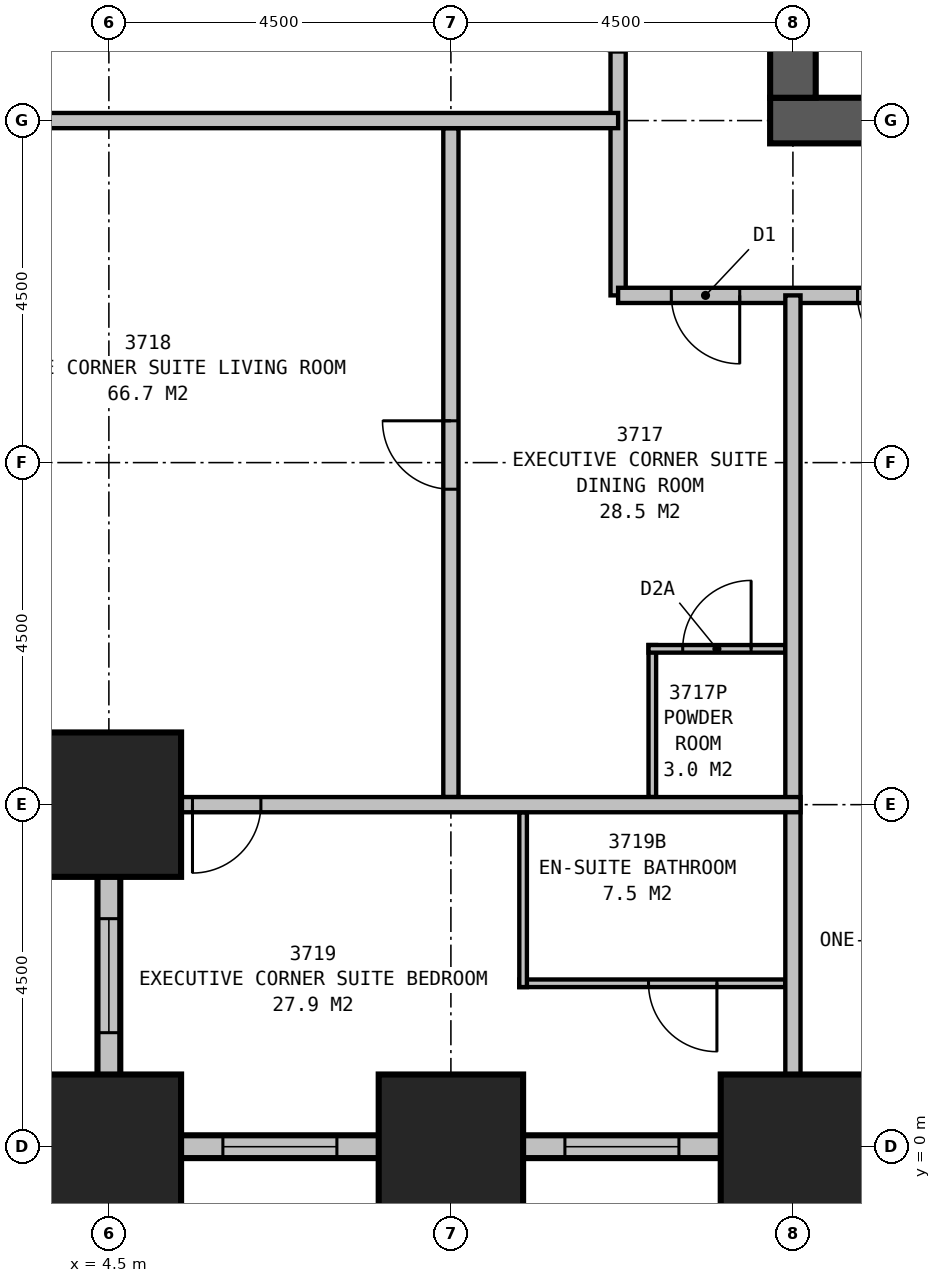
"""IFC4 building model, lengths in metres.
Left out: names, types, materials, properties, quantities, classifications, styles, units other than length and angle.
Written with IfcOpenShell. Run it as: python <this file> out.ifc"""

import sys

from ifc_helpers import new_model, si_unit, direction, frame, frame_2d, origin, origin_2d, place, context, subcontext, project, spatial, rectangle, extrude, element, fill, save


model = new_model("IFC4")
c1 = context("Model", 3, precision=1e-05, world=origin(), true_north=direction((0.0, 1.0)))
c2 = subcontext(c1, "Body", "Model", "MODEL_VIEW")
j1 = project(units=[si_unit("LENGTHUNIT", "METRE"), si_unit("PLANEANGLEUNIT", "RADIAN")], contexts=[c1])
p1 = place(None, origin())
s1 = spatial("IfcSite", under=j1, at=p1, CompositionType="ELEMENT")
p2 = place(p1, origin())
s2 = spatial("IfcBuilding", under=s1, at=p2, CompositionType="ELEMENT")
p3 = place(p2, frame((0.0, 0.0, 142.4)))
s3 = spatial("IfcBuildingStorey", under=s2, at=p3, CompositionType="ELEMENT", Elevation=142.4)
for number, where, z_axis, x_axis in (
    (1, (4.5, 4.5, 0.0), (0.0, 0.0, 1.0), (1.0, 0.0, 0.0)),
    (2, (4.5, 0.0, 0.0), (0.0, 0.0, 1.0), (1.0, 0.0, 0.0)),
    (3, (9.0, 0.0, 0.0), (0.0, 0.0, 1.0), (1.0, 0.0, 0.0)),
    (4, (13.5, 0.0, 0.0), (0.0, 0.0, 1.0), (1.0, 0.0, 0.0)),
):
    element("IfcColumn", number, at=place(p3, frame(where, z_axis=z_axis, x_axis=x_axis)), inside=s3, PredefinedType="COLUMN", context=c2, shape_type="SweptSolid", body=[
        extrude(rectangle(XDim=1.9, YDim=1.9, at=origin_2d()), origin(), (0.0, 0.0, 1.0), 3.5),
    ])
p4 = place(p3, frame((13.2, 13.5, 0.0), z_axis=(0.0, 0.0, 1.0), x_axis=(1.0, 0.0, 0.0)))
e5 = element("IfcWall", 5, at=p4, inside=s3, PredefinedType="SHEAR", context=c2, shape_type="SweptSolid", body=[
    extrude(rectangle(XDim=23.1, YDim=0.6, at=frame_2d((11.55, 0.0))), origin(), (0.0, 0.0, 1.0), 3.5),
])
p5 = place(p3, frame((13.5, 16.5, 0.0), z_axis=(0.0, 0.0, 1.0), x_axis=(0.0, -1.0, 0.0)))
e6 = element("IfcWall", 6, at=p5, inside=s3, PredefinedType="SHEAR", context=c2, shape_type="SweptSolid", body=[
    extrude(rectangle(XDim=2.7, YDim=0.6, at=frame_2d((1.35, 0.0))), origin(), (0.0, 0.0, 1.0), 3.5),
])
p6 = place(p3, frame((0.35, 4.5, 0.0), z_axis=(0.0, 0.0, 1.0), x_axis=(1.0, 0.0, 0.0)))
e7 = element("IfcWall", 7, at=p6, inside=s3, PredefinedType="STANDARD", context=c2, shape_type="SweptSolid", body=[
    extrude(rectangle(XDim=4.3, YDim=0.3, at=frame_2d((2.15, 0.0))), origin(), (0.0, 0.0, 1.0), 2.1),
])
p7 = place(p6, frame((1.4, 0.0, 0.5)))
e8 = element("IfcOpeningElement", 8, at=p7, cuts=e7, PredefinedType="OPENING", context=c2, shape_type="SweptSolid", body=[
    extrude(rectangle(XDim=1.5, YDim=1.4, at=frame_2d((0.75, 0.7))), frame((0.0, 0.16, 0.0), z_axis=(0.0, -1.0, 0.0), x_axis=(1.0, 0.0, 0.0)), (0.0, 0.0, 1.0), 0.32),
])
p8 = place(p3, frame((4.5, 4.65, 0.0), z_axis=(0.0, 0.0, 1.0), x_axis=(0.0, -1.0, 0.0)))
e9 = element("IfcWall", 9, at=p8, inside=s3, PredefinedType="STANDARD", context=c2, shape_type="SweptSolid", body=[
    extrude(rectangle(XDim=4.8, YDim=0.3, at=frame_2d((2.4, 0.0))), origin(), (0.0, 0.0, 1.0), 2.1),
])
p9 = place(p8, frame((1.65, 0.0, 0.5)))
e10 = element("IfcOpeningElement", 10, at=p9, cuts=e9, PredefinedType="OPENING", context=c2, shape_type="SweptSolid", body=[
    extrude(rectangle(XDim=1.5, YDim=1.4, at=frame_2d((0.75, 0.7))), frame((0.0, 0.16, 0.0), z_axis=(0.0, -1.0, 0.0), x_axis=(1.0, 0.0, 0.0)), (0.0, 0.0, 1.0), 0.32),
])
p10 = place(p3, frame((4.35, 0.0, 0.0), z_axis=(0.0, 0.0, 1.0), x_axis=(1.0, 0.0, 0.0)))
e11 = element("IfcWall", 11, at=p10, inside=s3, PredefinedType="STANDARD", context=c2, shape_type="SweptSolid", body=[
    extrude(rectangle(XDim=40.8, YDim=0.3, at=frame_2d((20.4, 0.0))), origin(), (0.0, 0.0, 1.0), 2.1),
])
p11 = place(p10, frame((1.65, 0.0, 0.5)))
e12 = element("IfcOpeningElement", 12, at=p11, cuts=e11, PredefinedType="OPENING", context=c2, shape_type="SweptSolid", body=[
    extrude(rectangle(XDim=1.5, YDim=1.4, at=frame_2d((0.75, 0.7))), frame((0.0, 0.16, 0.0), z_axis=(0.0, -1.0, 0.0), x_axis=(1.0, 0.0, 0.0)), (0.0, 0.0, 1.0), 0.32),
])
p12 = place(p10, frame((6.15, 0.0, 0.5)))
e13 = element("IfcOpeningElement", 13, at=p12, cuts=e11, PredefinedType="OPENING", context=c2, shape_type="SweptSolid", body=[
    extrude(rectangle(XDim=1.5, YDim=1.4, at=frame_2d((0.75, 0.7))), frame((0.0, 0.16, 0.0), z_axis=(0.0, -1.0, 0.0), x_axis=(1.0, 0.0, 0.0)), (0.0, 0.0, 1.0), 0.32),
])
p13 = place(p10, frame((10.65, 0.0, 0.5)))
e14 = element("IfcOpeningElement", 14, at=p13, cuts=e11, PredefinedType="OPENING", context=c2, shape_type="SweptSolid", body=[
    extrude(rectangle(XDim=1.5, YDim=1.4, at=frame_2d((0.75, 0.7))), frame((0.0, 0.16, 0.0), z_axis=(0.0, -1.0, 0.0), x_axis=(1.0, 0.0, 0.0)), (0.0, 0.0, 1.0), 0.32),
])
p14 = place(p10, frame((15.15, 0.0, 0.5)))
e15 = element("IfcOpeningElement", 15, at=p14, cuts=e11, PredefinedType="OPENING", context=c2, shape_type="SweptSolid", body=[
    extrude(rectangle(XDim=1.5, YDim=1.4, at=frame_2d((0.75, 0.7))), frame((0.0, 0.16, 0.0), z_axis=(0.0, -1.0, 0.0), x_axis=(1.0, 0.0, 0.0)), (0.0, 0.0, 1.0), 0.32),
])
p15 = place(p10, frame((19.65, 0.0, 0.5)))
e16 = element("IfcOpeningElement", 16, at=p15, cuts=e11, PredefinedType="OPENING", context=c2, shape_type="SweptSolid", body=[
    extrude(rectangle(XDim=1.5, YDim=1.4, at=frame_2d((0.75, 0.7))), frame((0.0, 0.16, 0.0), z_axis=(0.0, -1.0, 0.0), x_axis=(1.0, 0.0, 0.0)), (0.0, 0.0, 1.0), 0.32),
])
p16 = place(p10, frame((24.15, 0.0, 0.5)))
e17 = element("IfcOpeningElement", 17, at=p16, cuts=e11, PredefinedType="OPENING", context=c2, shape_type="SweptSolid", body=[
    extrude(rectangle(XDim=1.5, YDim=1.4, at=frame_2d((0.75, 0.7))), frame((0.0, 0.16, 0.0), z_axis=(0.0, -1.0, 0.0), x_axis=(1.0, 0.0, 0.0)), (0.0, 0.0, 1.0), 0.32),
])
p17 = place(p10, frame((28.65, 0.0, 0.5)))
e18 = element("IfcOpeningElement", 18, at=p17, cuts=e11, PredefinedType="OPENING", context=c2, shape_type="SweptSolid", body=[
    extrude(rectangle(XDim=1.5, YDim=1.4, at=frame_2d((0.75, 0.7))), frame((0.0, 0.16, 0.0), z_axis=(0.0, -1.0, 0.0), x_axis=(1.0, 0.0, 0.0)), (0.0, 0.0, 1.0), 0.32),
])
p18 = place(p10, frame((33.15, 0.0, 0.5)))
e19 = element("IfcOpeningElement", 19, at=p18, cuts=e11, PredefinedType="OPENING", context=c2, shape_type="SweptSolid", body=[
    extrude(rectangle(XDim=1.5, YDim=1.4, at=frame_2d((0.75, 0.7))), frame((0.0, 0.16, 0.0), z_axis=(0.0, -1.0, 0.0), x_axis=(1.0, 0.0, 0.0)), (0.0, 0.0, 1.0), 0.32),
])
p19 = place(p10, frame((37.65, 0.0, 0.5)))
e20 = element("IfcOpeningElement", 20, at=p19, cuts=e11, PredefinedType="OPENING", context=c2, shape_type="SweptSolid", body=[
    extrude(rectangle(XDim=1.5, YDim=1.4, at=frame_2d((0.75, 0.7))), frame((0.0, 0.16, 0.0), z_axis=(0.0, -1.0, 0.0), x_axis=(1.0, 0.0, 0.0)), (0.0, 0.0, 1.0), 0.32),
])
p20 = place(p3, frame((4.017, 36.149, 0.0), z_axis=(0.0, 0.0, 1.0), x_axis=(-0.110433201132, -0.993883548555, 0.0)))
e21 = element("IfcWall", 21, at=p20, inside=s3, PredefinedType="STANDARD", context=c2, shape_type="SweptSolid", body=[
    extrude(rectangle(XDim=31.994, YDim=0.3, at=frame_2d((15.997, 0.0))), origin(), (0.0, 0.0, 1.0), 2.1),
])
p21 = place(p20, frame((1.664, 0.0, 0.5)))
e22 = element("IfcOpeningElement", 22, at=p21, cuts=e21, PredefinedType="OPENING", context=c2, shape_type="SweptSolid", body=[
    extrude(rectangle(XDim=1.5, YDim=1.4, at=frame_2d((0.75, 0.7))), frame((0.0, 0.16, 0.0), z_axis=(0.0, -1.0, 0.0), x_axis=(1.0, 0.0, 0.0)), (0.0, 0.0, 1.0), 0.32),
])
p22 = place(p20, frame((6.192, 0.0, 0.5)))
e23 = element("IfcOpeningElement", 23, at=p22, cuts=e21, PredefinedType="OPENING", context=c2, shape_type="SweptSolid", body=[
    extrude(rectangle(XDim=1.5, YDim=1.4, at=frame_2d((0.75, 0.7))), frame((0.0, 0.16, 0.0), z_axis=(0.0, -1.0, 0.0), x_axis=(1.0, 0.0, 0.0)), (0.0, 0.0, 1.0), 0.32),
])
p23 = place(p20, frame((10.719, 0.0, 0.5)))
e24 = element("IfcOpeningElement", 24, at=p23, cuts=e21, PredefinedType="OPENING", context=c2, shape_type="SweptSolid", body=[
    extrude(rectangle(XDim=1.5, YDim=1.4, at=frame_2d((0.75, 0.7))), frame((0.0, 0.16, 0.0), z_axis=(0.0, -1.0, 0.0), x_axis=(1.0, 0.0, 0.0)), (0.0, 0.0, 1.0), 0.32),
])
p24 = place(p20, frame((15.247, 0.0, 0.5)))
e25 = element("IfcOpeningElement", 25, at=p24, cuts=e21, PredefinedType="OPENING", context=c2, shape_type="SweptSolid", body=[
    extrude(rectangle(XDim=1.5, YDim=1.4, at=frame_2d((0.75, 0.7))), frame((0.0, 0.16, 0.0), z_axis=(0.0, -1.0, 0.0), x_axis=(1.0, 0.0, 0.0)), (0.0, 0.0, 1.0), 0.32),
])
p25 = place(p20, frame((19.775, 0.0, 0.5)))
e26 = element("IfcOpeningElement", 26, at=p25, cuts=e21, PredefinedType="OPENING", context=c2, shape_type="SweptSolid", body=[
    extrude(rectangle(XDim=1.5, YDim=1.4, at=frame_2d((0.75, 0.7))), frame((0.0, 0.16, 0.0), z_axis=(0.0, -1.0, 0.0), x_axis=(1.0, 0.0, 0.0)), (0.0, 0.0, 1.0), 0.32),
])
p26 = place(p20, frame((24.302, 0.0, 0.5)))
e27 = element("IfcOpeningElement", 27, at=p26, cuts=e21, PredefinedType="OPENING", context=c2, shape_type="SweptSolid", body=[
    extrude(rectangle(XDim=1.5, YDim=1.4, at=frame_2d((0.75, 0.7))), frame((0.0, 0.16, 0.0), z_axis=(0.0, -1.0, 0.0), x_axis=(1.0, 0.0, 0.0)), (0.0, 0.0, 1.0), 0.32),
])
p27 = place(p20, frame((28.83, 0.0, 0.5)))
e28 = element("IfcOpeningElement", 28, at=p27, cuts=e21, PredefinedType="OPENING", context=c2, shape_type="SweptSolid", body=[
    extrude(rectangle(XDim=1.5, YDim=1.4, at=frame_2d((0.75, 0.7))), frame((0.0, 0.16, 0.0), z_axis=(0.0, -1.0, 0.0), x_axis=(1.0, 0.0, 0.0)), (0.0, 0.0, 1.0), 0.32),
])
p28 = place(p3, frame((11.2, 11.2, 0.0), z_axis=(0.0, 0.0, 1.0), x_axis=(1.0, 0.0, 0.0)))
e29 = element("IfcWall", 29, at=p28, inside=s3, PredefinedType="PARTITIONING", context=c2, shape_type="SweptSolid", body=[
    extrude(rectangle(XDim=27.1, YDim=0.2, at=frame_2d((13.55, 0.0))), origin(), (0.0, 0.0, 1.0), 3.25),
])
p29 = place(p28, frame((4.05, 0.0, 0.0), z_axis=(0.0, 0.0, 1.0), x_axis=(-1.0, 0.0, 0.0)))
e30 = element("IfcOpeningElement", 30, at=p29, cuts=e29, PredefinedType="OPENING", context=c2, shape_type="SweptSolid", body=[
    extrude(rectangle(XDim=0.9, YDim=2.1, at=frame_2d((0.45, 1.05))), frame((0.0, 0.11, 0.0), z_axis=(0.0, -1.0, 0.0), x_axis=(1.0, 0.0, 0.0)), (0.0, 0.0, 1.0), 0.22),
])
p30 = place(p28, frame((12.65, 0.0, 0.0), z_axis=(0.0, 0.0, 1.0), x_axis=(-1.0, 0.0, 0.0)))
e31 = element("IfcOpeningElement", 31, at=p30, cuts=e29, PredefinedType="OPENING", context=c2, shape_type="SweptSolid", body=[
    extrude(rectangle(XDim=1.0, YDim=2.1, at=frame_2d((0.5, 1.05))), frame((0.0, 0.11, 0.0), z_axis=(0.0, -1.0, 0.0), x_axis=(1.0, 0.0, 0.0)), (0.0, 0.0, 1.0), 0.22),
])
p31 = place(p28, frame((19.45, 0.0, 0.0), z_axis=(0.0, 0.0, 1.0), x_axis=(-1.0, 0.0, 0.0)))
e32 = element("IfcOpeningElement", 32, at=p31, cuts=e29, PredefinedType="OPENING", context=c2, shape_type="SweptSolid", body=[
    extrude(rectangle(XDim=0.9, YDim=2.1, at=frame_2d((0.45, 1.05))), frame((0.0, 0.11, 0.0), z_axis=(0.0, -1.0, 0.0), x_axis=(1.0, 0.0, 0.0)), (0.0, 0.0, 1.0), 0.22),
])
p32 = place(p28, frame((1.6, 0.0, 0.0), z_axis=(0.0, 0.0, 1.0), x_axis=(-1.0, 0.0, 0.0)))
e33 = element("IfcOpeningElement", 33, at=p32, cuts=e29, PredefinedType="OPENING", context=c2, shape_type="SweptSolid", body=[
    extrude(rectangle(XDim=0.9, YDim=2.1, at=frame_2d((0.45, 1.05))), frame((0.0, 0.11, 0.0), z_axis=(0.0, -1.0, 0.0), x_axis=(1.0, 0.0, 0.0)), (0.0, 0.0, 1.0), 0.22),
])
p33 = place(p28, frame((26.4, 0.0, 0.0), z_axis=(0.0, 0.0, 1.0), x_axis=(-1.0, 0.0, 0.0)))
e34 = element("IfcOpeningElement", 34, at=p33, cuts=e29, PredefinedType="OPENING", context=c2, shape_type="SweptSolid", body=[
    extrude(rectangle(XDim=0.9, YDim=2.1, at=frame_2d((0.45, 1.05))), frame((0.0, 0.11, 0.0), z_axis=(0.0, -1.0, 0.0), x_axis=(1.0, 0.0, 0.0)), (0.0, 0.0, 1.0), 0.22),
])
p34 = place(p3, frame((11.2, 11.2, 0.0), z_axis=(0.0, 0.0, 1.0), x_axis=(0.0, 1.0, 0.0)))
e35 = element("IfcWall", 35, at=p34, inside=s3, PredefinedType="PARTITIONING", context=c2, shape_type="SweptSolid", body=[
    extrude(rectangle(XDim=18.1, YDim=0.2, at=frame_2d((9.05, 0.0))), origin(), (0.0, 0.0, 1.0), 3.25),
])
p35 = place(p34, frame((3.2, 0.0, 0.0)))
e36 = element("IfcOpeningElement", 36, at=p35, cuts=e35, PredefinedType="OPENING", context=c2, shape_type="SweptSolid", body=[
    extrude(rectangle(XDim=1.0, YDim=2.1, at=frame_2d((0.5, 1.05))), frame((0.0, 0.11, 0.0), z_axis=(0.0, -1.0, 0.0), x_axis=(1.0, 0.0, 0.0)), (0.0, 0.0, 1.0), 0.22),
])
p36 = place(p34, frame((7.65, 0.0, 0.0)))
e37 = element("IfcOpeningElement", 37, at=p36, cuts=e35, PredefinedType="OPENING", context=c2, shape_type="SweptSolid", body=[
    extrude(rectangle(XDim=0.9, YDim=2.1, at=frame_2d((0.45, 1.05))), frame((0.0, 0.11, 0.0), z_axis=(0.0, -1.0, 0.0), x_axis=(1.0, 0.0, 0.0)), (0.0, 0.0, 1.0), 0.22),
])
p37 = place(p3, frame((11.2, 13.5, 0.0), z_axis=(0.0, 0.0, 1.0), x_axis=(-1.0, 0.0, 0.0)))
e38 = element("IfcWall", 38, at=p37, inside=s3, PredefinedType="PARTITIONING", context=c2, shape_type="SweptSolid", body=[
    extrude(rectangle(XDim=9.921, YDim=0.2, at=frame_2d((4.96, 0.0))), origin(), (0.0, 0.0, 1.0), 1.9),
])
p38 = place(p3, frame((13.5, 11.2, 0.0), z_axis=(0.0, 0.0, 1.0), x_axis=(0.0, -1.0, 0.0)))
e39 = element("IfcWall", 39, at=p38, inside=s3, PredefinedType="PARTITIONING", context=c2, shape_type="SweptSolid", body=[
    extrude(rectangle(XDim=11.2, YDim=0.2, at=frame_2d((5.6, 0.0))), origin(), (0.0, 0.0, 1.0), 2.2),
])
p39 = place(p3, frame((13.6, 4.5, 0.0), z_axis=(0.0, 0.0, 1.0), x_axis=(-1.0, 0.0, 0.0)))
e40 = element("IfcWall", 40, at=p39, inside=s3, PredefinedType="PARTITIONING", context=c2, shape_type="SweptSolid", body=[
    extrude(rectangle(XDim=9.1, YDim=0.2, at=frame_2d((4.55, 0.0))), origin(), (0.0, 0.0, 1.0), 3.25),
])
p40 = place(p39, frame((7.1, 0.0, 0.0)))
e41 = element("IfcOpeningElement", 41, at=p40, cuts=e40, PredefinedType="OPENING", context=c2, shape_type="SweptSolid", body=[
    extrude(rectangle(XDim=0.9, YDim=2.1, at=frame_2d((0.45, 1.05))), frame((0.0, 0.11, 0.0), z_axis=(0.0, -1.0, 0.0), x_axis=(1.0, 0.0, 0.0)), (0.0, 0.0, 1.0), 0.22),
])
p41 = place(p3, frame((9.0, 4.6, 0.0), z_axis=(0.0, 0.0, 1.0), x_axis=(0.0, 1.0, 0.0)))
e42 = element("IfcWall", 42, at=p41, inside=s3, PredefinedType="PARTITIONING", context=c2, shape_type="SweptSolid", body=[
    extrude(rectangle(XDim=8.8, YDim=0.2, at=frame_2d((4.4, 0.0))), origin(), (0.0, 0.0, 1.0), 2.2),
])
p42 = place(p41, frame((4.05, 0.0, 0.0)))
e43 = element("IfcOpeningElement", 43, at=p42, cuts=e42, PredefinedType="OPENING", context=c2, shape_type="SweptSolid", body=[
    extrude(rectangle(XDim=0.9, YDim=2.1, at=frame_2d((0.45, 1.05))), frame((0.0, 0.11, 0.0), z_axis=(0.0, -1.0, 0.0), x_axis=(1.0, 0.0, 0.0)), (0.0, 0.0, 1.0), 0.22),
])
p43 = place(p3, frame((11.65, 4.6, 0.0), z_axis=(0.0, 0.0, 1.0), x_axis=(0.0, 1.0, 0.0)))
e44 = element("IfcWall", 44, at=p43, inside=s3, PredefinedType="PLUMBINGWALL", context=c2, shape_type="SweptSolid", body=[
    extrude(rectangle(XDim=2.0, YDim=0.1, at=frame_2d((1.0, 0.0))), origin(), (0.0, 0.0, 1.0), 3.25),
])
p44 = place(p3, frame((13.4, 6.55, 0.0), z_axis=(0.0, 0.0, 1.0), x_axis=(-1.0, 0.0, 0.0)))
e45 = element("IfcWall", 45, at=p44, inside=s3, PredefinedType="PLUMBINGWALL", context=c2, shape_type="SweptSolid", body=[
    extrude(rectangle(XDim=1.8, YDim=0.1, at=frame_2d((0.9, 0.0))), origin(), (0.0, 0.0, 1.0), 3.25),
])
p45 = place(p44, frame((1.35, 0.0, 0.0), z_axis=(0.0, 0.0, 1.0), x_axis=(-1.0, 0.0, 0.0)))
e46 = element("IfcOpeningElement", 46, at=p45, cuts=e45, PredefinedType="OPENING", context=c2, shape_type="SweptSolid", body=[
    extrude(rectangle(XDim=0.9, YDim=2.1, at=frame_2d((0.45, 1.05))), frame((0.0, 0.06, 0.0), z_axis=(0.0, -1.0, 0.0), x_axis=(1.0, 0.0, 0.0)), (0.0, 0.0, 1.0), 0.12),
])
p46 = place(p3, frame((9.95, 4.4, 0.0), z_axis=(0.0, 0.0, 1.0), x_axis=(0.0, -1.0, 0.0)))
e47 = element("IfcWall", 47, at=p46, inside=s3, PredefinedType="PLUMBINGWALL", context=c2, shape_type="SweptSolid", body=[
    extrude(rectangle(XDim=2.3, YDim=0.1, at=frame_2d((1.15, 0.0))), origin(), (0.0, 0.0, 1.0), 3.25),
])
p47 = place(p3, frame((13.4, 2.15, 0.0), z_axis=(0.0, 0.0, 1.0), x_axis=(-1.0, 0.0, 0.0)))
e48 = element("IfcWall", 48, at=p47, inside=s3, PredefinedType="PLUMBINGWALL", context=c2, shape_type="SweptSolid", body=[
    extrude(rectangle(XDim=3.5, YDim=0.1, at=frame_2d((1.75, 0.0))), origin(), (0.0, 0.0, 1.0), 3.25),
])
p48 = place(p47, frame((0.9, 0.0, 0.0)))
e49 = element("IfcOpeningElement", 49, at=p48, cuts=e48, PredefinedType="OPENING", context=c2, shape_type="SweptSolid", body=[
    extrude(rectangle(XDim=0.9, YDim=2.1, at=frame_2d((0.45, 1.05))), frame((0.0, 0.06, 0.0), z_axis=(0.0, -1.0, 0.0), x_axis=(1.0, 0.0, 0.0)), (0.0, 0.0, 1.0), 0.12),
])
p49 = place(p9, origin())
e50 = element("IfcWindow", 50, at=p49, inside=s3, PartitioningType="SINGLE_PANEL", PredefinedType="WINDOW", context=c2, shape_type="SweptSolid", body=[
    extrude(rectangle(XDim=1.5, YDim=1.4, at=frame_2d((0.75, 0.7))), frame((0.0, 0.03, 0.0), z_axis=(0.0, -1.0, 0.0), x_axis=(1.0, 0.0, 0.0)), (0.0, 0.0, 1.0), 0.06),
])
fill(e10, e50)
p50 = place(p11, origin())
e51 = element("IfcWindow", 51, at=p50, inside=s3, PartitioningType="SINGLE_PANEL", PredefinedType="WINDOW", context=c2, shape_type="SweptSolid", body=[
    extrude(rectangle(XDim=1.5, YDim=1.4, at=frame_2d((0.75, 0.7))), frame((0.0, 0.03, 0.0), z_axis=(0.0, -1.0, 0.0), x_axis=(1.0, 0.0, 0.0)), (0.0, 0.0, 1.0), 0.06),
])
fill(e12, e51)
p51 = place(p12, origin())
e52 = element("IfcWindow", 52, at=p51, inside=s3, PartitioningType="SINGLE_PANEL", PredefinedType="WINDOW", context=c2, shape_type="SweptSolid", body=[
    extrude(rectangle(XDim=1.5, YDim=1.4, at=frame_2d((0.75, 0.7))), frame((0.0, 0.03, 0.0), z_axis=(0.0, -1.0, 0.0), x_axis=(1.0, 0.0, 0.0)), (0.0, 0.0, 1.0), 0.06),
])
fill(e13, e52)
p52 = place(p29, origin())
e53 = element("IfcDoor", 53, at=p52, inside=s3, OperationType="SINGLE_SWING_LEFT", PredefinedType="DOOR", context=c2, shape_type="SweptSolid", body=[
    extrude(rectangle(XDim=0.9, YDim=2.1, at=frame_2d((0.45, 1.05))), frame((0.0, 0.025, 0.0), z_axis=(0.0, -1.0, 0.0), x_axis=(1.0, 0.0, 0.0)), (0.0, 0.0, 1.0), 0.05),
])
fill(e30, e53)
p53 = place(p32, origin())
e54 = element("IfcDoor", 54, at=p53, inside=s3, OperationType="SINGLE_SWING_LEFT", PredefinedType="DOOR", context=c2, shape_type="SweptSolid", body=[
    extrude(rectangle(XDim=0.9, YDim=2.1, at=frame_2d((0.45, 1.05))), frame((0.0, 0.025, 0.0), z_axis=(0.0, -1.0, 0.0), x_axis=(1.0, 0.0, 0.0)), (0.0, 0.0, 1.0), 0.05),
])
fill(e33, e54)
p54 = place(p40, origin())
e55 = element("IfcDoor", 55, at=p54, inside=s3, OperationType="SINGLE_SWING_RIGHT", PredefinedType="DOOR", context=c2, shape_type="SweptSolid", body=[
    extrude(rectangle(XDim=0.9, YDim=2.1, at=frame_2d((0.45, 1.05))), frame((0.0, 0.025, 0.0), z_axis=(0.0, -1.0, 0.0), x_axis=(1.0, 0.0, 0.0)), (0.0, 0.0, 1.0), 0.05),
])
fill(e41, e55)
p55 = place(p42, origin())
e56 = element("IfcDoor", 56, at=p55, inside=s3, OperationType="SINGLE_SWING_RIGHT", PredefinedType="DOOR", context=c2, shape_type="SweptSolid", body=[
    extrude(rectangle(XDim=0.9, YDim=2.1, at=frame_2d((0.45, 1.05))), frame((0.0, 0.025, 0.0), z_axis=(0.0, -1.0, 0.0), x_axis=(1.0, 0.0, 0.0)), (0.0, 0.0, 1.0), 0.05),
])
fill(e43, e56)
p56 = place(p45, origin())
e57 = element("IfcDoor", 57, at=p56, inside=s3, OperationType="SINGLE_SWING_RIGHT", PredefinedType="DOOR", context=c2, shape_type="SweptSolid", body=[
    extrude(rectangle(XDim=0.9, YDim=2.1, at=frame_2d((0.45, 1.05))), frame((0.0, 0.025, 0.0), z_axis=(0.0, -1.0, 0.0), x_axis=(1.0, 0.0, 0.0)), (0.0, 0.0, 1.0), 0.05),
])
fill(e46, e57)
p57 = place(p48, origin())
e58 = element("IfcDoor", 58, at=p57, inside=s3, OperationType="SINGLE_SWING_LEFT", PredefinedType="DOOR", context=c2, shape_type="SweptSolid", body=[
    extrude(rectangle(XDim=0.9, YDim=2.1, at=frame_2d((0.45, 1.05))), frame((0.0, 0.025, 0.0), z_axis=(0.0, -1.0, 0.0), x_axis=(1.0, 0.0, 0.0)), (0.0, 0.0, 1.0), 0.05),
])
fill(e49, e58)
save(model, sys.argv[1])
